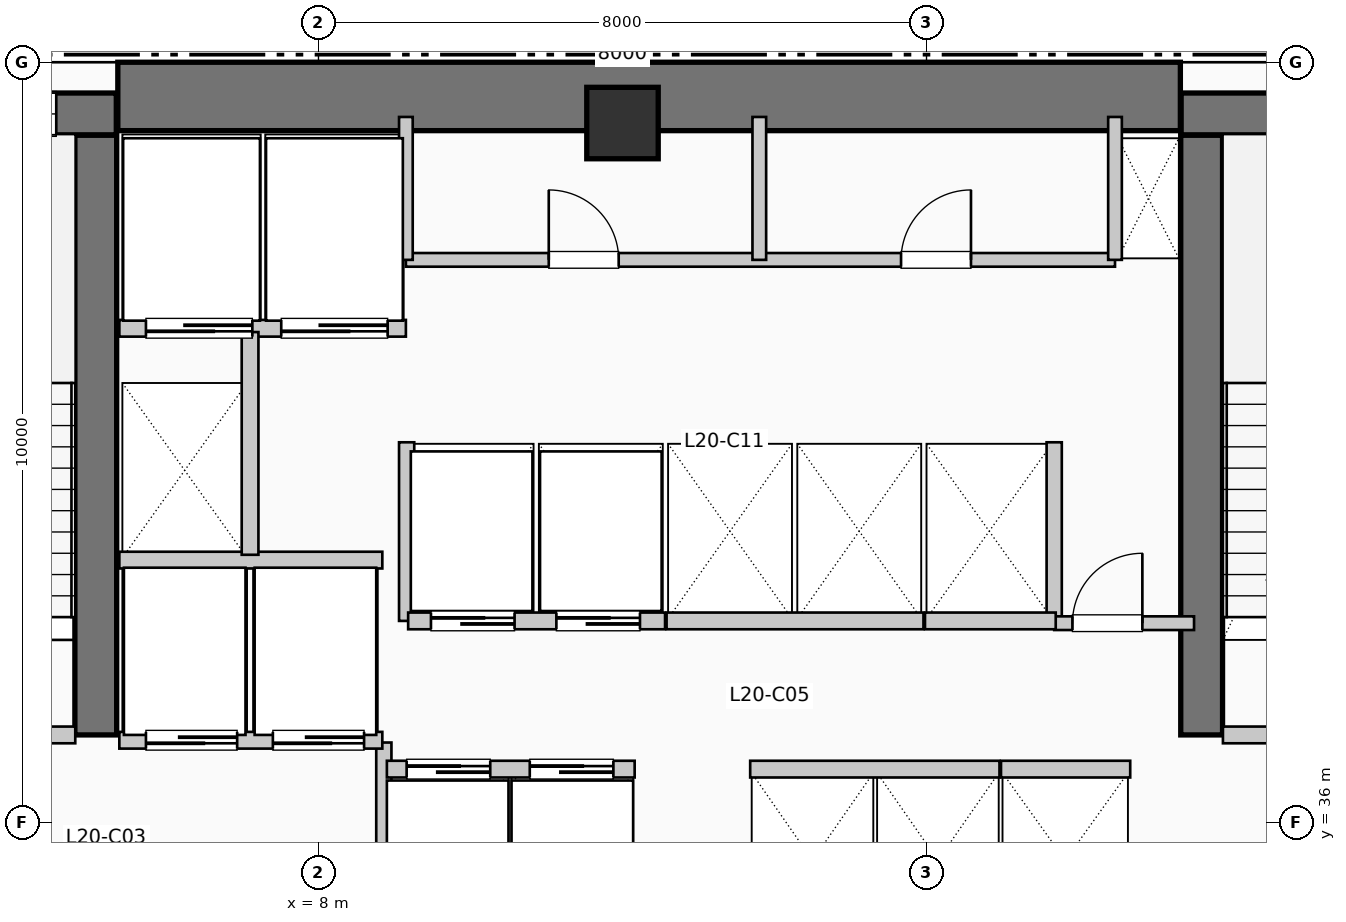
"""IFC4 building model, lengths in metres.
Left out: names, types, materials, properties, quantities, classifications, styles, units other than length and angle.
Written with IfcOpenShell. Run it as: python <this file> out.ifc"""

import sys

from ifc_helpers import new_model, si_unit, direction, frame, frame_2d, origin, origin_2d, place, context, subcontext, project, spatial, rectangle, extrude, element, fill, save


model = new_model("IFC4")
c1 = context("Model", 3, precision=1e-05, world=origin(), true_north=direction((0.0, 1.0)))
c2 = subcontext(c1, "Body", "Model", "MODEL_VIEW")
j1 = project(units=[si_unit("LENGTHUNIT", "METRE"), si_unit("PLANEANGLEUNIT", "RADIAN")], contexts=[c1])
p1 = place(None, origin())
s1 = spatial("IfcSite", under=j1, at=p1, CompositionType="ELEMENT")
p2 = place(p1, origin())
s2 = spatial("IfcBuilding", under=s1, at=p2, CompositionType="ELEMENT")
p3 = place(p2, frame((0.0, 0.0, 85.8)))
s3 = spatial("IfcBuildingStorey", under=s2, at=p3, CompositionType="ELEMENT", Elevation=85.8)
p4 = place(p3, frame((5.36, 45.55, 0.0), z_axis=(0.0, 0.0, 1.0), x_axis=(1.0, 0.0, 0.0)))
e1 = element("IfcWall", 1, at=p4, inside=s3, PredefinedType="SHEAR", context=c2, shape_type="SweptSolid", body=[
    extrude(rectangle(XDim=13.98, YDim=0.9, at=frame_2d((6.99, 0.0))), origin(), (0.0, 0.0, 1.0), 3.96),
])
p5 = place(p3, frame((5.07, 37.15, 0.0), z_axis=(0.0, 0.0, 1.0), x_axis=(0.0, 1.0, 0.0)))
e2 = element("IfcWall", 2, at=p5, inside=s3, PredefinedType="SHEAR", context=c2, shape_type="SweptSolid", body=[
    extrude(rectangle(XDim=7.89, YDim=0.55, at=frame_2d((3.945, 0.0))), origin(), (0.0, 0.0, 1.0), 3.96),
])
p6 = place(p3, frame((1.1, 45.32, 0.0), z_axis=(0.0, 0.0, 1.0), x_axis=(1.0, 0.0, 0.0)))
e3 = element("IfcWall", 3, at=p6, inside=s3, PredefinedType="SHEAR", context=c2, shape_type="SweptSolid", body=[
    extrude(rectangle(XDim=4.24, YDim=0.55, at=frame_2d((2.12, 0.0))), origin(), (0.0, 0.0, 1.0), 3.96),
])
p7 = place(p6, frame((2.05, 0.0, 1.05)))
e4 = element("IfcOpeningElement", 4, at=p7, cuts=e3, PredefinedType="OPENING", context=c2, shape_type="SweptSolid", body=[
    extrude(rectangle(XDim=1.4, YDim=1.8, at=frame_2d((0.7, 0.9))), frame((0.0, 0.285, 0.0), z_axis=(0.0, -1.0, 0.0), x_axis=(1.0, 0.0, 0.0)), (0.0, 0.0, 1.0), 0.57),
])
p8 = place(p3, frame((19.62, 37.15, 0.0), z_axis=(0.0, 0.0, 1.0), x_axis=(0.0, 1.0, 0.0)))
e5 = element("IfcWall", 5, at=p8, inside=s3, PredefinedType="SHEAR", context=c2, shape_type="SweptSolid", body=[
    extrude(rectangle(XDim=7.89, YDim=0.55, at=frame_2d((3.945, 0.0))), origin(), (0.0, 0.0, 1.0), 3.96),
])
p9 = place(p3, frame((19.35, 45.32, 0.0), z_axis=(0.0, 0.0, 1.0), x_axis=(1.0, 0.0, 0.0)))
e6 = element("IfcWall", 6, at=p9, inside=s3, PredefinedType="SHEAR", context=c2, shape_type="SweptSolid", body=[
    extrude(rectangle(XDim=3.69, YDim=0.55, at=frame_2d((1.845, 0.0))), origin(), (0.0, 0.0, 1.0), 3.96),
])
p10 = place(p9, frame((1.15, 0.0, 1.05)))
e7 = element("IfcOpeningElement", 7, at=p10, cuts=e6, PredefinedType="OPENING", context=c2, shape_type="SweptSolid", body=[
    extrude(rectangle(XDim=1.4, YDim=1.8, at=frame_2d((0.7, 0.9))), frame((0.0, 0.285, 0.0), z_axis=(0.0, -1.0, 0.0), x_axis=(1.0, 0.0, 0.0)), (0.0, 0.0, 1.0), 0.57),
])
p11 = place(p3, frame((12.0, 45.2, 0.0), z_axis=(0.0, 0.0, 1.0), x_axis=(1.0, 0.0, 0.0)))
e8 = element("IfcColumn", 8, at=p11, inside=s3, PredefinedType="COLUMN", context=c2, shape_type="SweptSolid", body=[
    extrude(rectangle(XDim=0.94, YDim=0.94, at=origin_2d()), origin(), (0.0, 0.0, 1.0), 3.96),
])
p12 = place(p3, frame((1.65, 37.15, 0.0), z_axis=(0.0, 0.0, 1.0), x_axis=(1.0, 0.0, 0.0)))
e9 = element("IfcWall", 9, at=p12, inside=s3, PredefinedType="PARTITIONING", context=c2, shape_type="SweptSolid", body=[
    extrude(rectangle(XDim=3.15, YDim=0.22, at=frame_2d((1.575, 0.0))), origin(), (0.0, 0.0, 1.0), 3.71),
])
p13 = place(p12, frame((2.05, 0.0, 0.0), z_axis=(0.0, 0.0, 1.0), x_axis=(-1.0, 0.0, 0.0)))
e10 = element("IfcOpeningElement", 10, at=p13, cuts=e9, PredefinedType="OPENING", context=c2, shape_type="SweptSolid", body=[
    extrude(rectangle(XDim=1.05, YDim=2.15, at=frame_2d((0.525, 1.075))), frame((0.0, 0.12, 0.0), z_axis=(0.0, -1.0, 0.0), x_axis=(1.0, 0.0, 0.0)), (0.0, 0.0, 1.0), 0.24),
])
p14 = place(p3, frame((8.86, 34.55, 0.0), z_axis=(0.0, 0.0, 1.0), x_axis=(0.0, 1.0, 0.0)))
e11 = element("IfcWall", 11, at=p14, inside=s3, PredefinedType="PARTITIONING", context=c2, shape_type="SweptSolid", body=[
    extrude(rectangle(XDim=2.5, YDim=0.2, at=frame_2d((1.25, 0.0))), origin(), (0.0, 0.0, 1.0), 3.71),
])
p15 = place(p3, frame((19.9, 37.15, 0.0), z_axis=(0.0, 0.0, 1.0), x_axis=(1.0, 0.0, 0.0)))
e12 = element("IfcWall", 12, at=p15, inside=s3, PredefinedType="PARTITIONING", context=c2, shape_type="SweptSolid", body=[
    extrude(rectangle(XDim=3.15, YDim=0.22, at=frame_2d((1.575, 0.0))), origin(), (0.0, 0.0, 1.0), 3.71),
])
p16 = place(p15, frame((2.05, 0.0, 0.0), z_axis=(0.0, 0.0, 1.0), x_axis=(-1.0, 0.0, 0.0)))
e13 = element("IfcOpeningElement", 13, at=p16, cuts=e12, PredefinedType="OPENING", context=c2, shape_type="SweptSolid", body=[
    extrude(rectangle(XDim=1.05, YDim=2.15, at=frame_2d((0.525, 1.075))), frame((0.0, 0.12, 0.0), z_axis=(0.0, -1.0, 0.0), x_axis=(1.0, 0.0, 0.0)), (0.0, 0.0, 1.0), 0.24),
])
p17 = place(p3, frame((5.38, 37.08, 0.0), z_axis=(0.0, 0.0, 1.0), x_axis=(1.0, 0.0, 0.0)))
e14 = element("IfcWall", 14, at=p17, inside=s3, PredefinedType="PARTITIONING", context=c2, shape_type="SweptSolid", body=[
    extrude(rectangle(XDim=3.46, YDim=0.22, at=frame_2d((1.73, 0.0))), origin(), (0.0, 0.0, 1.0), 3.71),
])
p18 = place(p17, frame((1.55, 0.0, 0.0), z_axis=(0.0, 0.0, 1.0), x_axis=(-1.0, 0.0, 0.0)))
e15 = element("IfcOpeningElement", 15, at=p18, cuts=e14, PredefinedType="OPENING", context=c2, shape_type="SweptSolid", body=[
    extrude(rectangle(XDim=1.2, YDim=2.2, at=frame_2d((0.6, 1.1))), frame((0.0, 0.12, 0.0), z_axis=(0.0, -1.0, 0.0), x_axis=(1.0, 0.0, 0.0)), (0.0, 0.0, 1.0), 0.24),
])
p19 = place(p17, frame((3.22, 0.0, 0.0), z_axis=(0.0, 0.0, 1.0), x_axis=(-1.0, 0.0, 0.0)))
e16 = element("IfcOpeningElement", 16, at=p19, cuts=e14, PredefinedType="OPENING", context=c2, shape_type="SweptSolid", body=[
    extrude(rectangle(XDim=1.2, YDim=2.2, at=frame_2d((0.6, 1.1))), frame((0.0, 0.12, 0.0), z_axis=(0.0, -1.0, 0.0), x_axis=(1.0, 0.0, 0.0)), (0.0, 0.0, 1.0), 0.24),
])
p20 = place(p3, frame((5.38, 39.45, 0.0), z_axis=(0.0, 0.0, 1.0), x_axis=(1.0, 0.0, 0.0)))
e17 = element("IfcWall", 17, at=p20, inside=s3, PredefinedType="PARTITIONING", context=c2, shape_type="SweptSolid", body=[
    extrude(rectangle(XDim=3.46, YDim=0.22, at=frame_2d((1.73, 0.0))), origin(), (0.0, 0.0, 1.0), 3.71),
])
p21 = place(p3, frame((5.38, 42.5, 0.0), z_axis=(0.0, 0.0, 1.0), x_axis=(1.0, 0.0, 0.0)))
e18 = element("IfcWall", 18, at=p21, inside=s3, PredefinedType="PARTITIONING", context=c2, shape_type="SweptSolid", body=[
    extrude(rectangle(XDim=3.77, YDim=0.22, at=frame_2d((1.885, 0.0))), origin(), (0.0, 0.0, 1.0), 3.71),
])
p22 = place(p21, frame((1.75, 0.0, 0.0), z_axis=(0.0, 0.0, 1.0), x_axis=(-1.0, 0.0, 0.0)))
e19 = element("IfcOpeningElement", 19, at=p22, cuts=e18, PredefinedType="OPENING", context=c2, shape_type="SweptSolid", body=[
    extrude(rectangle(XDim=1.4, YDim=2.2, at=frame_2d((0.7, 1.1))), frame((0.0, 0.12, 0.0), z_axis=(0.0, -1.0, 0.0), x_axis=(1.0, 0.0, 0.0)), (0.0, 0.0, 1.0), 0.24),
])
p23 = place(p21, frame((3.53, 0.0, 0.0), z_axis=(0.0, 0.0, 1.0), x_axis=(-1.0, 0.0, 0.0)))
e20 = element("IfcOpeningElement", 20, at=p23, cuts=e18, PredefinedType="OPENING", context=c2, shape_type="SweptSolid", body=[
    extrude(rectangle(XDim=1.4, YDim=2.2, at=frame_2d((0.7, 1.1))), frame((0.0, 0.12, 0.0), z_axis=(0.0, -1.0, 0.0), x_axis=(1.0, 0.0, 0.0)), (0.0, 0.0, 1.0), 0.24),
])
p24 = place(p3, frame((7.1, 39.52, 0.0), z_axis=(0.0, 0.0, 1.0), x_axis=(0.0, 1.0, 0.0)))
e21 = element("IfcWall", 21, at=p24, inside=s3, PredefinedType="PARTITIONING", context=c2, shape_type="SweptSolid", body=[
    extrude(rectangle(XDim=2.93, YDim=0.22, at=frame_2d((1.465, 0.0))), origin(), (0.0, 0.0, 1.0), 3.71),
])
for number, where, z_axis, x_axis in (
    (22, (9.16, 38.65, 0.0), (0.0, 0.0, 1.0), (0.0, 1.0, 0.0)),
    (23, (17.68, 38.65, 0.0), (0.0, 0.0, 1.0), (0.0, 1.0, 0.0)),
):
    element("IfcWall", number, at=place(p3, frame(where, z_axis=z_axis, x_axis=x_axis)), inside=s3, PredefinedType="PARTITIONING", context=c2, shape_type="SweptSolid", body=[
        extrude(rectangle(XDim=2.35, YDim=0.2, at=frame_2d((1.175, 0.0))), origin(), (0.0, 0.0, 1.0), 3.71),
    ])
p25 = place(p3, frame((17.68, 38.62, 0.0), z_axis=(0.0, 0.0, 1.0), x_axis=(1.0, 0.0, 0.0)))
e24 = element("IfcWall", 24, at=p25, inside=s3, PredefinedType="PARTITIONING", context=c2, shape_type="SweptSolid", body=[
    extrude(rectangle(XDim=1.84, YDim=0.18, at=frame_2d((0.92, 0.0))), origin(), (0.0, 0.0, 1.0), 3.71),
])
p26 = place(p25, frame((0.24, 0.0, 0.0)))
e25 = element("IfcOpeningElement", 25, at=p26, cuts=e24, PredefinedType="OPENING", context=c2, shape_type="SweptSolid", body=[
    extrude(rectangle(XDim=0.92, YDim=2.1, at=frame_2d((0.46, 1.05))), frame((0.0, 0.1, 0.0), z_axis=(0.0, -1.0, 0.0), x_axis=(1.0, 0.0, 0.0)), (0.0, 0.0, 1.0), 0.2),
])
p27 = place(p3, frame((8.9, 36.7, 0.0), z_axis=(0.0, 0.0, 1.0), x_axis=(1.0, 0.0, 0.0)))
e26 = element("IfcWall", 26, at=p27, inside=s3, PredefinedType="PARTITIONING", context=c2, shape_type="SweptSolid", body=[
    extrude(rectangle(XDim=3.26, YDim=0.22, at=frame_2d((1.63, 0.0))), origin(), (0.0, 0.0, 1.0), 3.71),
])
p28 = place(p27, frame((0.26, 0.0, 0.0)))
e27 = element("IfcOpeningElement", 27, at=p28, cuts=e26, PredefinedType="OPENING", context=c2, shape_type="SweptSolid", body=[
    extrude(rectangle(XDim=1.1, YDim=2.2, at=frame_2d((0.55, 1.1))), frame((0.0, 0.12, 0.0), z_axis=(0.0, -1.0, 0.0), x_axis=(1.0, 0.0, 0.0)), (0.0, 0.0, 1.0), 0.24),
])
p29 = place(p27, frame((1.88, 0.0, 0.0)))
e28 = element("IfcOpeningElement", 28, at=p29, cuts=e26, PredefinedType="OPENING", context=c2, shape_type="SweptSolid", body=[
    extrude(rectangle(XDim=1.1, YDim=2.2, at=frame_2d((0.55, 1.1))), frame((0.0, 0.12, 0.0), z_axis=(0.0, -1.0, 0.0), x_axis=(1.0, 0.0, 0.0)), (0.0, 0.0, 1.0), 0.24),
])
p30 = place(p3, frame((9.18, 38.65, 0.0), z_axis=(0.0, 0.0, 1.0), x_axis=(1.0, 0.0, 0.0)))
e29 = element("IfcWall", 29, at=p30, inside=s3, PredefinedType="PARTITIONING", context=c2, shape_type="SweptSolid", body=[
    extrude(rectangle(XDim=3.38, YDim=0.22, at=frame_2d((1.69, 0.0))), origin(), (0.0, 0.0, 1.0), 3.71),
])
p31 = place(p30, frame((0.3, 0.0, 0.0)))
e30 = element("IfcOpeningElement", 30, at=p31, cuts=e29, PredefinedType="OPENING", context=c2, shape_type="SweptSolid", body=[
    extrude(rectangle(XDim=1.1, YDim=2.2, at=frame_2d((0.55, 1.1))), frame((0.0, 0.12, 0.0), z_axis=(0.0, -1.0, 0.0), x_axis=(1.0, 0.0, 0.0)), (0.0, 0.0, 1.0), 0.24),
])
p32 = place(p30, frame((1.95, 0.0, 0.0)))
e31 = element("IfcOpeningElement", 31, at=p32, cuts=e29, PredefinedType="OPENING", context=c2, shape_type="SweptSolid", body=[
    extrude(rectangle(XDim=1.1, YDim=2.2, at=frame_2d((0.55, 1.1))), frame((0.0, 0.12, 0.0), z_axis=(0.0, -1.0, 0.0), x_axis=(1.0, 0.0, 0.0)), (0.0, 0.0, 1.0), 0.24),
])
p33 = place(p3, frame((13.68, 36.7, 0.0), z_axis=(0.0, 0.0, 1.0), x_axis=(1.0, 0.0, 0.0)))
e32 = element("IfcWall", 32, at=p33, inside=s3, PredefinedType="PARTITIONING", context=c2, shape_type="SweptSolid", body=[
    extrude(rectangle(XDim=3.28, YDim=0.22, at=frame_2d((1.64, 0.0))), origin(), (0.0, 0.0, 1.0), 3.71),
])
p34 = place(p3, frame((12.58, 38.65, 0.0), z_axis=(0.0, 0.0, 1.0), x_axis=(1.0, 0.0, 0.0)))
e33 = element("IfcWall", 33, at=p34, inside=s3, PredefinedType="PARTITIONING", context=c2, shape_type="SweptSolid", body=[
    extrude(rectangle(XDim=3.38, YDim=0.22, at=frame_2d((1.69, 0.0))), origin(), (0.0, 0.0, 1.0), 3.71),
])
p35 = place(p3, frame((16.98, 36.7, 0.0), z_axis=(0.0, 0.0, 1.0), x_axis=(1.0, 0.0, 0.0)))
e34 = element("IfcWall", 34, at=p35, inside=s3, PredefinedType="PARTITIONING", context=c2, shape_type="SweptSolid", body=[
    extrude(rectangle(XDim=1.7, YDim=0.22, at=frame_2d((0.85, 0.0))), origin(), (0.0, 0.0, 1.0), 3.71),
])
p36 = place(p3, frame((15.98, 38.65, 0.0), z_axis=(0.0, 0.0, 1.0), x_axis=(1.0, 0.0, 0.0)))
e35 = element("IfcWall", 35, at=p36, inside=s3, PredefinedType="PARTITIONING", context=c2, shape_type="SweptSolid", body=[
    extrude(rectangle(XDim=1.72, YDim=0.22, at=frame_2d((0.86, 0.0))), origin(), (0.0, 0.0, 1.0), 3.71),
])
p37 = place(p3, frame((9.15, 43.4, 0.0), z_axis=(0.0, 0.0, 1.0), x_axis=(1.0, 0.0, 0.0)))
e36 = element("IfcWall", 36, at=p37, inside=s3, PredefinedType="PLUMBINGWALL", context=c2, shape_type="SweptSolid", body=[
    extrude(rectangle(XDim=9.33, YDim=0.18, at=frame_2d((4.665, 0.0))), origin(), (0.0, 0.0, 1.0), 3.71),
])
p38 = place(p37, frame((1.88, 0.0, 0.0)))
e37 = element("IfcOpeningElement", 37, at=p38, cuts=e36, PredefinedType="OPENING", context=c2, shape_type="SweptSolid", body=[
    extrude(rectangle(XDim=0.92, YDim=2.1, at=frame_2d((0.46, 1.05))), frame((0.0, 0.1, 0.0), z_axis=(0.0, -1.0, 0.0), x_axis=(1.0, 0.0, 0.0)), (0.0, 0.0, 1.0), 0.2),
])
p39 = place(p37, frame((6.515, 0.0, 0.0)))
e38 = element("IfcOpeningElement", 38, at=p39, cuts=e36, PredefinedType="OPENING", context=c2, shape_type="SweptSolid", body=[
    extrude(rectangle(XDim=0.92, YDim=2.1, at=frame_2d((0.46, 1.05))), frame((0.0, 0.1, 0.0), z_axis=(0.0, -1.0, 0.0), x_axis=(1.0, 0.0, 0.0)), (0.0, 0.0, 1.0), 0.2),
])
for number, where, z_axis, x_axis in (
    (39, (9.15, 43.4, 0.0), (0.0, 0.0, 1.0), (0.0, 1.0, 0.0)),
    (40, (18.48, 43.4, 0.0), (0.0, 0.0, 1.0), (0.0, 1.0, 0.0)),
    (41, (13.8, 43.4, 0.0), (0.0, 0.0, 1.0), (0.0, 1.0, 0.0)),
):
    element("IfcWall", number, at=place(p3, frame(where, z_axis=z_axis, x_axis=x_axis)), inside=s3, PredefinedType="PLUMBINGWALL", context=c2, shape_type="SweptSolid", body=[
        extrude(rectangle(XDim=1.88, YDim=0.18, at=frame_2d((0.94, 0.0))), origin(), (0.0, 0.0, 1.0), 3.71),
    ])
p40 = place(p7, origin())
e42 = element("IfcWindow", 42, at=p40, inside=s3, PartitioningType="SINGLE_PANEL", PredefinedType="WINDOW", context=c2, shape_type="SweptSolid", body=[
    extrude(rectangle(XDim=1.4, YDim=1.8, at=frame_2d((0.7, 0.9))), frame((0.0, 0.03, 0.0), z_axis=(0.0, -1.0, 0.0), x_axis=(1.0, 0.0, 0.0)), (0.0, 0.0, 1.0), 0.06),
])
fill(e4, e42)
p41 = place(p18, origin())
e43 = element("IfcDoor", 43, at=p41, inside=s3, OperationType="SLIDING_TO_RIGHT", PredefinedType="DOOR", context=c2, shape_type="SweptSolid", body=[
    extrude(rectangle(XDim=1.2, YDim=2.2, at=frame_2d((0.6, 1.1))), frame((0.0, 0.025, 0.0), z_axis=(0.0, -1.0, 0.0), x_axis=(1.0, 0.0, 0.0)), (0.0, 0.0, 1.0), 0.05),
])
fill(e15, e43)
p42 = place(p19, origin())
e44 = element("IfcDoor", 44, at=p42, inside=s3, OperationType="SLIDING_TO_RIGHT", PredefinedType="DOOR", context=c2, shape_type="SweptSolid", body=[
    extrude(rectangle(XDim=1.2, YDim=2.2, at=frame_2d((0.6, 1.1))), frame((0.0, 0.025, 0.0), z_axis=(0.0, -1.0, 0.0), x_axis=(1.0, 0.0, 0.0)), (0.0, 0.0, 1.0), 0.05),
])
fill(e16, e44)
p43 = place(p22, origin())
e45 = element("IfcDoor", 45, at=p43, inside=s3, OperationType="SLIDING_TO_LEFT", PredefinedType="DOOR", context=c2, shape_type="SweptSolid", body=[
    extrude(rectangle(XDim=1.4, YDim=2.2, at=frame_2d((0.7, 1.1))), frame((0.0, 0.025, 0.0), z_axis=(0.0, -1.0, 0.0), x_axis=(1.0, 0.0, 0.0)), (0.0, 0.0, 1.0), 0.05),
])
fill(e19, e45)
p44 = place(p23, origin())
e46 = element("IfcDoor", 46, at=p44, inside=s3, OperationType="SLIDING_TO_LEFT", PredefinedType="DOOR", context=c2, shape_type="SweptSolid", body=[
    extrude(rectangle(XDim=1.4, YDim=2.2, at=frame_2d((0.7, 1.1))), frame((0.0, 0.025, 0.0), z_axis=(0.0, -1.0, 0.0), x_axis=(1.0, 0.0, 0.0)), (0.0, 0.0, 1.0), 0.05),
])
fill(e20, e46)
p45 = place(p26, origin())
e47 = element("IfcDoor", 47, at=p45, inside=s3, OperationType="SINGLE_SWING_RIGHT", PredefinedType="DOOR", context=c2, shape_type="SweptSolid", body=[
    extrude(rectangle(XDim=0.92, YDim=2.1, at=frame_2d((0.46, 1.05))), frame((0.0, 0.025, 0.0), z_axis=(0.0, -1.0, 0.0), x_axis=(1.0, 0.0, 0.0)), (0.0, 0.0, 1.0), 0.05),
])
fill(e25, e47)
p46 = place(p28, origin())
e48 = element("IfcDoor", 48, at=p46, inside=s3, OperationType="SLIDING_TO_LEFT", PredefinedType="DOOR", context=c2, shape_type="SweptSolid", body=[
    extrude(rectangle(XDim=1.1, YDim=2.2, at=frame_2d((0.55, 1.1))), frame((0.0, 0.025, 0.0), z_axis=(0.0, -1.0, 0.0), x_axis=(1.0, 0.0, 0.0)), (0.0, 0.0, 1.0), 0.05),
])
fill(e27, e48)
p47 = place(p29, origin())
e49 = element("IfcDoor", 49, at=p47, inside=s3, OperationType="SLIDING_TO_LEFT", PredefinedType="DOOR", context=c2, shape_type="SweptSolid", body=[
    extrude(rectangle(XDim=1.1, YDim=2.2, at=frame_2d((0.55, 1.1))), frame((0.0, 0.025, 0.0), z_axis=(0.0, -1.0, 0.0), x_axis=(1.0, 0.0, 0.0)), (0.0, 0.0, 1.0), 0.05),
])
fill(e28, e49)
p48 = place(p31, origin())
e50 = element("IfcDoor", 50, at=p48, inside=s3, OperationType="SLIDING_TO_LEFT", PredefinedType="DOOR", context=c2, shape_type="SweptSolid", body=[
    extrude(rectangle(XDim=1.1, YDim=2.2, at=frame_2d((0.55, 1.1))), frame((0.0, 0.025, 0.0), z_axis=(0.0, -1.0, 0.0), x_axis=(1.0, 0.0, 0.0)), (0.0, 0.0, 1.0), 0.05),
])
fill(e30, e50)
p49 = place(p32, origin())
e51 = element("IfcDoor", 51, at=p49, inside=s3, OperationType="SLIDING_TO_LEFT", PredefinedType="DOOR", context=c2, shape_type="SweptSolid", body=[
    extrude(rectangle(XDim=1.1, YDim=2.2, at=frame_2d((0.55, 1.1))), frame((0.0, 0.025, 0.0), z_axis=(0.0, -1.0, 0.0), x_axis=(1.0, 0.0, 0.0)), (0.0, 0.0, 1.0), 0.05),
])
fill(e31, e51)
p50 = place(p38, origin())
e52 = element("IfcDoor", 52, at=p50, inside=s3, OperationType="SINGLE_SWING_LEFT", PredefinedType="DOOR", context=c2, shape_type="SweptSolid", body=[
    extrude(rectangle(XDim=0.92, YDim=2.1, at=frame_2d((0.46, 1.05))), frame((0.0, 0.025, 0.0), z_axis=(0.0, -1.0, 0.0), x_axis=(1.0, 0.0, 0.0)), (0.0, 0.0, 1.0), 0.05),
])
fill(e37, e52)
p51 = place(p39, origin())
e53 = element("IfcDoor", 53, at=p51, inside=s3, OperationType="SINGLE_SWING_RIGHT", PredefinedType="DOOR", context=c2, shape_type="SweptSolid", body=[
    extrude(rectangle(XDim=0.92, YDim=2.1, at=frame_2d((0.46, 1.05))), frame((0.0, 0.025, 0.0), z_axis=(0.0, -1.0, 0.0), x_axis=(1.0, 0.0, 0.0)), (0.0, 0.0, 1.0), 0.05),
])
fill(e38, e53)
save(model, sys.argv[1])
